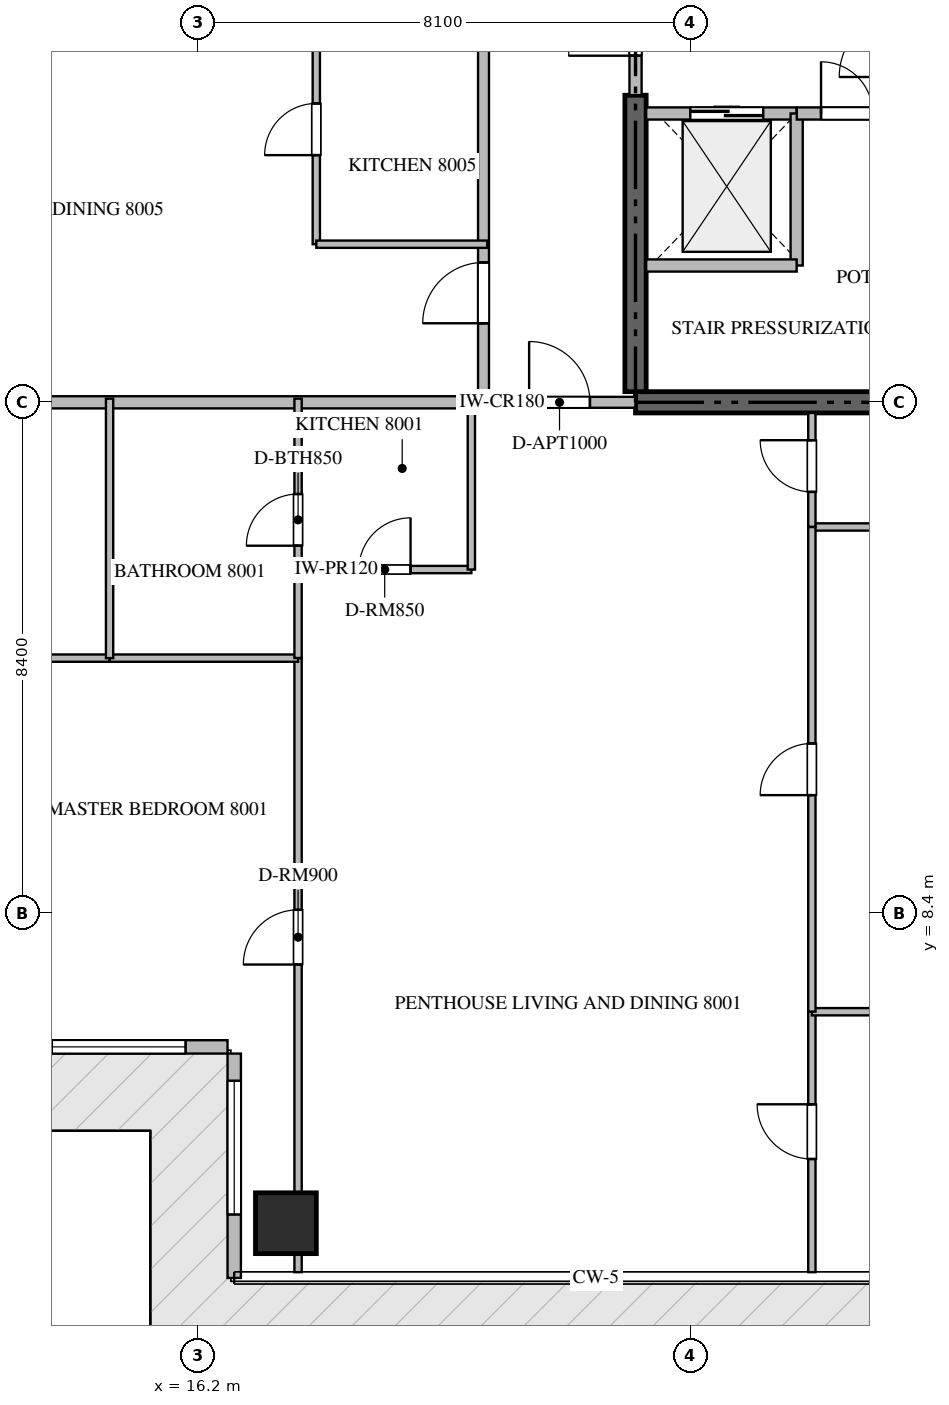
"""IFC4 building model, lengths in metres.
Left out: names, types, materials, properties, quantities, classifications, styles, units other than length and angle.
Written with IfcOpenShell. Run it as: python <this file> out.ifc"""

import sys

from ifc_helpers import new_model, si_unit, direction, frame, frame_2d, origin, origin_2d, place, context, subcontext, project, spatial, rectangle, extrude, source, transform, mapped, element, fill, save


model = new_model("IFC4")
c1 = context("Model", 3, precision=1e-05, world=origin(), true_north=direction((0.0, 1.0)))
c2 = subcontext(c1, "Body", "Model", "MODEL_VIEW")
j1 = project(units=[si_unit("LENGTHUNIT", "METRE"), si_unit("PLANEANGLEUNIT", "RADIAN")], contexts=[c1])
p1 = place(None, origin())
s1 = spatial("IfcSite", under=j1, at=p1, CompositionType="ELEMENT")
p2 = place(p1, origin())
s2 = spatial("IfcBuilding", under=s1, at=p2, CompositionType="ELEMENT")
p3 = place(p2, frame((0.0, 0.0, 321.8)))
s3 = spatial("IfcBuildingStorey", under=s2, at=p3, CompositionType="ELEMENT", Elevation=321.8)
p4 = place(p3, frame((23.4, 16.8, -0.26), z_axis=(0.0, 0.0, 1.0), x_axis=(1.0, 0.0, 0.0)))
e1 = element("IfcWall", 1, at=p4, inside=s3, PredefinedType="SHEAR", context=c2, shape_type="SweptSolid", body=[
    extrude(rectangle(XDim=18.0, YDim=0.35, at=frame_2d((9.0, 0.0))), origin(), (0.0, 0.0, 1.0), 4.048),
])
p5 = place(p3, frame((23.4, 16.975, -0.26), z_axis=(0.0, 0.0, 1.0), x_axis=(0.0, 1.0, 0.0)))
e2 = element("IfcWall", 2, at=p5, inside=s3, PredefinedType="SHEAR", context=c2, shape_type="SweptSolid", body=[
    extrude(rectangle(XDim=4.875, YDim=0.35, at=frame_2d((2.438, 0.0))), origin(), (0.0, 0.0, 1.0), 4.048),
])
m1 = source(origin(), c2, "Body", "SweptSolid", [
    extrude(rectangle(XDim=1.0, YDim=1.0, at=origin_2d()), origin(), (0.0, 0.0, 1.0), 4.05),
])
p6 = place(p3, frame((17.65, 3.3, -0.26), z_axis=(0.0, 0.0, 1.0), x_axis=(1.0, 0.0, 0.0)))
e3 = element("IfcColumn", 3, at=p6, inside=s3, PredefinedType="COLUMN", context=c2, shape_type="MappedRepresentation", body=[
    mapped(m1, transform((0.0, 0.0, 0.0), scale=1.0)),
])
p7 = place(p3, frame((13.11, 6.2, 0.0), z_axis=(0.0, 0.0, 1.0), x_axis=(1.0, 0.0, 0.0)))
e4 = element("IfcWall", 4, at=p7, inside=s3, PredefinedType="ELEMENTEDWALL", context=c2, shape_type="SweptSolid", body=[
    extrude(rectangle(XDim=3.58, YDim=0.22, at=frame_2d((1.79, 0.0))), origin(), (0.0, 0.0, 1.0), 3.775),
])
p8 = place(p7, frame((0.69, 0.0, 0.65)))
e5 = element("IfcOpeningElement", 5, at=p8, cuts=e4, PredefinedType="OPENING", context=c2, shape_type="SweptSolid", body=[
    extrude(rectangle(XDim=2.2, YDim=2.4, at=frame_2d((1.1, 1.2))), frame((0.0, 0.12, 0.0), z_axis=(0.0, -1.0, 0.0), x_axis=(1.0, 0.0, 0.0)), (0.0, 0.0, 1.0), 0.24),
])
p9 = place(p3, frame((16.8, 6.09, 0.0), z_axis=(0.0, 0.0, 1.0), x_axis=(0.0, -1.0, 0.0)))
e6 = element("IfcWall", 6, at=p9, inside=s3, PredefinedType="ELEMENTEDWALL", context=c2, shape_type="SweptSolid", body=[
    extrude(rectangle(XDim=3.69, YDim=0.22, at=frame_2d((1.845, 0.0))), origin(), (0.0, 0.0, 1.0), 3.775),
])
p10 = place(p9, frame((0.447, 0.0, 0.65)))
e7 = element("IfcOpeningElement", 7, at=p10, cuts=e6, PredefinedType="OPENING", context=c2, shape_type="SweptSolid", body=[
    extrude(rectangle(XDim=2.2, YDim=2.4, at=frame_2d((1.1, 1.2))), frame((0.0, 0.12, 0.0), z_axis=(0.0, -1.0, 0.0), x_axis=(1.0, 0.0, 0.0)), (0.0, 0.0, 1.0), 0.24),
])
p11 = place(p3, frame((23.575, 21.55, 0.0), z_axis=(0.0, 0.0, 1.0), x_axis=(1.0, 0.0, 0.0)))
e8 = element("IfcWall", 8, at=p11, inside=s3, PredefinedType="STANDARD", context=c2, shape_type="SweptSolid", body=[
    extrude(rectangle(XDim=2.475, YDim=0.2, at=frame_2d((1.238, 0.0))), origin(), (0.0, 0.0, 1.0), 3.79),
])
p12 = place(p11, frame((0.725, 0.0, 0.0)))
e9 = element("IfcOpeningElement", 9, at=p12, cuts=e8, PredefinedType="OPENING", context=c2, shape_type="SweptSolid", body=[
    extrude(rectangle(XDim=1.2, YDim=2.2, at=frame_2d((0.6, 1.1))), frame((0.0, 0.11, 0.0), z_axis=(0.0, -1.0, 0.0), x_axis=(1.0, 0.0, 0.0)), (0.0, 0.0, 1.0), 0.22),
])
p13 = place(p3, frame((26.05, 19.05, 0.0), z_axis=(0.0, 0.0, 1.0), x_axis=(0.0, 1.0, 0.0)))
e10 = element("IfcWall", 10, at=p13, inside=s3, PredefinedType="STANDARD", context=c2, shape_type="SweptSolid", body=[
    extrude(rectangle(XDim=2.5, YDim=0.2, at=frame_2d((1.25, 0.0))), origin(), (0.0, 0.0, 1.0), 3.79),
])
p14 = place(p3, frame((23.575, 19.05, 0.0), z_axis=(0.0, 0.0, 1.0), x_axis=(1.0, 0.0, 0.0)))
e11 = element("IfcWall", 11, at=p14, inside=s3, PredefinedType="STANDARD", context=c2, shape_type="SweptSolid", body=[
    extrude(rectangle(XDim=2.475, YDim=0.2, at=frame_2d((1.238, 0.0))), origin(), (0.0, 0.0, 1.0), 3.79),
])
p15 = place(p3, frame((26.052, 21.55, 0.0), z_axis=(0.0, 0.0, 1.0), x_axis=(1.0, 0.0, 0.0)))
e12 = element("IfcWall", 12, at=p15, inside=s3, PredefinedType="STANDARD", context=c2, shape_type="SweptSolid", body=[
    extrude(rectangle(XDim=1.648, YDim=0.2, at=frame_2d((0.824, 0.0))), origin(), (0.0, 0.0, 1.0), 3.79),
])
p16 = place(p15, frame((0.399, 0.0, 0.0)))
e13 = element("IfcOpeningElement", 13, at=p16, cuts=e12, PredefinedType="OPENING", context=c2, shape_type="SweptSolid", body=[
    extrude(rectangle(XDim=0.85, YDim=2.1, at=frame_2d((0.425, 1.05))), frame((0.0, 0.11, 0.0), z_axis=(0.0, -1.0, 0.0), x_axis=(1.0, 0.0, 0.0)), (0.0, 0.0, 1.0), 0.22),
])
p17 = place(p3, frame((23.4, 21.852, 0.0), z_axis=(0.0, 0.0, 1.0), x_axis=(0.0, 1.0, 0.0)))
e14 = element("IfcWall", 14, at=p17, inside=s3, PredefinedType="STANDARD", context=c2, shape_type="SweptSolid", body=[
    extrude(rectangle(XDim=2.396, YDim=0.2, at=frame_2d((1.198, 0.0))), origin(), (0.0, 0.0, 1.0), 3.79),
])
p18 = place(p17, frame((0.648, 0.0, 0.0)))
e15 = element("IfcOpeningElement", 15, at=p18, cuts=e14, PredefinedType="OPENING", context=c2, shape_type="SweptSolid", body=[
    extrude(rectangle(XDim=1.1, YDim=2.15, at=frame_2d((0.55, 1.075))), frame((0.0, 0.11, 0.0), z_axis=(0.0, -1.0, 0.0), x_axis=(1.0, 0.0, 0.0)), (0.0, 0.0, 1.0), 0.22),
])
p19 = place(p3, frame((9.282, 16.8, 0.0), z_axis=(0.0, 0.0, 1.0), x_axis=(1.0, 0.0, 0.0)))
e16 = element("IfcWall", 16, at=p19, inside=s3, PredefinedType="PARTITIONING", context=c2, shape_type="SweptSolid", body=[
    extrude(rectangle(XDim=11.618, YDim=0.2, at=frame_2d((5.809, 0.0))), origin(), (0.0, 0.0, 1.0), 3.79),
])
p20 = place(p3, frame((20.902, 16.8, 0.0), z_axis=(0.0, 0.0, 1.0), x_axis=(1.0, 0.0, 0.0)))
e17 = element("IfcWall", 17, at=p20, inside=s3, PredefinedType="PARTITIONING", context=c2, shape_type="SweptSolid", body=[
    extrude(rectangle(XDim=2.496, YDim=0.18, at=frame_2d((1.248, 0.0))), origin(), (0.0, 0.0, 1.0), 3.79),
])
p21 = place(p20, frame((0.748, 0.0, 0.0)))
e18 = element("IfcOpeningElement", 18, at=p21, cuts=e17, PredefinedType="OPENING", context=c2, shape_type="SweptSolid", body=[
    extrude(rectangle(XDim=1.0, YDim=2.15, at=frame_2d((0.5, 1.075))), frame((0.0, 0.1, 0.0), z_axis=(0.0, -1.0, 0.0), x_axis=(1.0, 0.0, 0.0)), (0.0, 0.0, 1.0), 0.2),
])
p22 = place(p3, frame((20.9, 16.8, 0.0), z_axis=(0.0, 0.0, 1.0), x_axis=(0.0, 1.0, 0.0)))
e19 = element("IfcWall", 19, at=p22, inside=s3, PredefinedType="PARTITIONING", context=c2, shape_type="SweptSolid", body=[
    extrude(rectangle(XDim=16.8, YDim=0.18, at=frame_2d((8.4, 0.0))), origin(), (0.0, 0.0, 1.0), 3.79),
])
p23 = place(p22, frame((1.3, 0.0, 0.0)))
e20 = element("IfcOpeningElement", 20, at=p23, cuts=e19, PredefinedType="OPENING", context=c2, shape_type="SweptSolid", body=[
    extrude(rectangle(XDim=1.0, YDim=2.15, at=frame_2d((0.5, 1.075))), frame((0.0, 0.1, 0.0), z_axis=(0.0, -1.0, 0.0), x_axis=(1.0, 0.0, 0.0)), (0.0, 0.0, 1.0), 0.2),
])
p24 = place(p3, frame((17.85, 14.05, 0.0), z_axis=(0.0, 0.0, 1.0), x_axis=(1.0, 0.0, 0.0)))
e21 = element("IfcWall", 21, at=p24, inside=s3, PredefinedType="PARTITIONING", context=c2, shape_type="SweptSolid", body=[
    extrude(rectangle(XDim=2.85, YDim=0.12, at=frame_2d((1.425, 0.0))), origin(), (0.0, 0.0, 1.0), 3.79),
])
p25 = place(p24, frame((1.0, 0.0, 0.0)))
e22 = element("IfcOpeningElement", 22, at=p25, cuts=e21, PredefinedType="OPENING", context=c2, shape_type="SweptSolid", body=[
    extrude(rectangle(XDim=0.85, YDim=2.1, at=frame_2d((0.425, 1.05))), frame((0.0, 0.07, 0.0), z_axis=(0.0, -1.0, 0.0), x_axis=(1.0, 0.0, 0.0)), (0.0, 0.0, 1.0), 0.14),
])
p26 = place(p3, frame((20.7, 14.05, 0.0), z_axis=(0.0, 0.0, 1.0), x_axis=(0.0, 1.0, 0.0)))
e23 = element("IfcWall", 23, at=p26, inside=s3, PredefinedType="PARTITIONING", context=c2, shape_type="SweptSolid", body=[
    extrude(rectangle(XDim=2.81, YDim=0.12, at=frame_2d((1.405, 0.0))), origin(), (0.0, 0.0, 1.0), 3.79),
])
p27 = place(p3, frame((17.85, 2.495, 0.0), z_axis=(0.0, 0.0, 1.0), x_axis=(0.0, 1.0, 0.0)))
e24 = element("IfcWall", 24, at=p27, inside=s3, PredefinedType="PARTITIONING", context=c2, shape_type="SweptSolid", body=[
    extrude(rectangle(XDim=10.098, YDim=0.12, at=frame_2d((5.049, 0.0))), origin(), (0.0, 0.0, 1.0), 3.292),
])
p28 = place(p27, frame((5.059, 0.0, 0.0)))
e25 = element("IfcOpeningElement", 25, at=p28, cuts=e24, PredefinedType="OPENING", context=c2, shape_type="SweptSolid", body=[
    extrude(rectangle(XDim=0.9, YDim=2.1, at=frame_2d((0.45, 1.05))), frame((0.0, 0.07, 0.0), z_axis=(0.0, -1.0, 0.0), x_axis=(1.0, 0.0, 0.0)), (0.0, 0.0, 1.0), 0.14),
])
p29 = place(p3, frame((9.295, 12.593, 0.0), z_axis=(0.0, 0.0, 1.0), x_axis=(1.0, 0.0, 0.0)))
e26 = element("IfcWall", 26, at=p29, inside=s3, PredefinedType="PARTITIONING", context=c2, shape_type="SweptSolid", body=[
    extrude(rectangle(XDim=5.455, YDim=0.12, at=frame_2d((2.728, 0.0))), origin(), (0.0, 0.0, 1.0), 3.79),
])
p30 = place(p29, frame((3.224, 0.0, 0.0)))
e27 = element("IfcOpeningElement", 27, at=p30, cuts=e26, PredefinedType="OPENING", context=c2, shape_type="SweptSolid", body=[
    extrude(rectangle(XDim=0.85, YDim=2.1, at=frame_2d((0.425, 1.05))), frame((0.0, 0.07, 0.0), z_axis=(0.0, -1.0, 0.0), x_axis=(1.0, 0.0, 0.0)), (0.0, 0.0, 1.0), 0.14),
])
p31 = place(p3, frame((14.752, 12.593, 0.0), z_axis=(0.0, 0.0, 1.0), x_axis=(1.0, 0.0, 0.0)))
e28 = element("IfcWall", 28, at=p31, inside=s3, PredefinedType="PARTITIONING", context=c2, shape_type="SweptSolid", body=[
    extrude(rectangle(XDim=3.098, YDim=0.12, at=frame_2d((1.549, 0.0))), origin(), (0.0, 0.0, 1.0), 3.79),
])
p32 = place(p3, frame((14.75, 12.593, 0.0), z_axis=(0.0, 0.0, 1.0), x_axis=(0.0, 1.0, 0.0)))
e29 = element("IfcWall", 29, at=p32, inside=s3, PredefinedType="PARTITIONING", context=c2, shape_type="SweptSolid", body=[
    extrude(rectangle(XDim=4.267, YDim=0.12, at=frame_2d((2.134, 0.0))), origin(), (0.0, 0.0, 1.0), 3.79),
])
p33 = place(p3, frame((17.85, 12.595, 0.0), z_axis=(0.0, 0.0, 1.0), x_axis=(0.0, 1.0, 0.0)))
e30 = element("IfcWall", 30, at=p33, inside=s3, PredefinedType="PARTITIONING", context=c2, shape_type="SweptSolid", body=[
    extrude(rectangle(XDim=4.265, YDim=0.12, at=frame_2d((2.133, 0.0))), origin(), (0.0, 0.0, 1.0), 3.372),
])
p34 = place(p33, frame((1.847, 0.0, 0.0)))
e31 = element("IfcOpeningElement", 31, at=p34, cuts=e30, PredefinedType="OPENING", context=c2, shape_type="SweptSolid", body=[
    extrude(rectangle(XDim=0.85, YDim=2.1, at=frame_2d((0.425, 1.05))), frame((0.0, 0.07, 0.0), z_axis=(0.0, -1.0, 0.0), x_axis=(1.0, 0.0, 0.0)), (0.0, 0.0, 1.0), 0.14),
])
p35 = place(p3, frame((26.3, 2.495, 0.0), z_axis=(0.0, 0.0, 1.0), x_axis=(0.0, 1.0, 0.0)))
e32 = element("IfcWall", 32, at=p35, inside=s3, PredefinedType="PARTITIONING", context=c2, shape_type="SweptSolid", body=[
    extrude(rectangle(XDim=4.283, YDim=0.12, at=frame_2d((2.142, 0.0))), origin(), (0.0, 0.0, 1.0), 3.79),
])
p36 = place(p35, frame((1.861, 0.0, 0.0)))
e33 = element("IfcOpeningElement", 33, at=p36, cuts=e32, PredefinedType="OPENING", context=c2, shape_type="SweptSolid", body=[
    extrude(rectangle(XDim=0.9, YDim=2.1, at=frame_2d((0.45, 1.05))), frame((0.0, 0.07, 0.0), z_axis=(0.0, -1.0, 0.0), x_axis=(1.0, 0.0, 0.0)), (0.0, 0.0, 1.0), 0.14),
])
for number, where, z_axis, x_axis in (
    (34, (26.3, 6.778, 0.0), (0.0, 0.0, 1.0), (1.0, 0.0, 0.0)),
    (35, (26.3, 14.75, 0.0), (0.0, 0.0, 1.0), (1.0, 0.0, 0.0)),
):
    element("IfcWall", number, at=place(p3, frame(where, z_axis=z_axis, x_axis=x_axis)), inside=s3, PredefinedType="PARTITIONING", context=c2, shape_type="SweptSolid", body=[
        extrude(rectangle(XDim=7.16, YDim=0.12, at=frame_2d((3.58, 0.0))), origin(), (0.0, 0.0, 1.0), 3.79),
    ])
p37 = place(p3, frame((26.3, 6.78, 0.0), z_axis=(0.0, 0.0, 1.0), x_axis=(0.0, 1.0, 0.0)))
e36 = element("IfcWall", 36, at=p37, inside=s3, PredefinedType="PARTITIONING", context=c2, shape_type="SweptSolid", body=[
    extrude(rectangle(XDim=7.97, YDim=0.12, at=frame_2d((3.985, 0.0))), origin(), (0.0, 0.0, 1.0), 3.79),
])
p38 = place(p37, frame((3.56, 0.0, 0.0)))
e37 = element("IfcOpeningElement", 37, at=p38, cuts=e36, PredefinedType="OPENING", context=c2, shape_type="SweptSolid", body=[
    extrude(rectangle(XDim=0.85, YDim=2.1, at=frame_2d((0.425, 1.05))), frame((0.0, 0.07, 0.0), z_axis=(0.0, -1.0, 0.0), x_axis=(1.0, 0.0, 0.0)), (0.0, 0.0, 1.0), 0.14),
])
p39 = place(p3, frame((26.3, 14.752, 0.0), z_axis=(0.0, 0.0, 1.0), x_axis=(0.0, 1.0, 0.0)))
e38 = element("IfcWall", 38, at=p39, inside=s3, PredefinedType="PARTITIONING", context=c2, shape_type="SweptSolid", body=[
    extrude(rectangle(XDim=1.873, YDim=0.12, at=frame_2d((0.937, 0.0))), origin(), (0.0, 0.0, 1.0), 3.79),
])
p40 = place(p39, frame((0.575, 0.0, 0.0)))
e39 = element("IfcOpeningElement", 39, at=p40, cuts=e38, PredefinedType="OPENING", context=c2, shape_type="SweptSolid", body=[
    extrude(rectangle(XDim=0.85, YDim=2.1, at=frame_2d((0.425, 1.05))), frame((0.0, 0.07, 0.0), z_axis=(0.0, -1.0, 0.0), x_axis=(1.0, 0.0, 0.0)), (0.0, 0.0, 1.0), 0.14),
])
p41 = place(p3, frame((18.15, 19.4, 0.0), z_axis=(0.0, 0.0, 1.0), x_axis=(0.0, 1.0, 0.0)))
e40 = element("IfcWall", 40, at=p41, inside=s3, PredefinedType="PARTITIONING", context=c2, shape_type="SweptSolid", body=[
    extrude(rectangle(XDim=3.78, YDim=0.12, at=frame_2d((1.89, 0.0))), origin(), (0.0, 0.0, 1.0), 3.79),
])
p42 = place(p41, frame((1.465, 0.0, 0.0)))
e41 = element("IfcOpeningElement", 41, at=p42, cuts=e40, PredefinedType="OPENING", context=c2, shape_type="SweptSolid", body=[
    extrude(rectangle(XDim=0.85, YDim=2.1, at=frame_2d((0.425, 1.05))), frame((0.0, 0.07, 0.0), z_axis=(0.0, -1.0, 0.0), x_axis=(1.0, 0.0, 0.0)), (0.0, 0.0, 1.0), 0.14),
])
p43 = place(p3, frame((18.15, 19.4, 0.0), z_axis=(0.0, 0.0, 1.0), x_axis=(1.0, 0.0, 0.0)))
e42 = element("IfcWall", 42, at=p43, inside=s3, PredefinedType="PARTITIONING", context=c2, shape_type="SweptSolid", body=[
    extrude(rectangle(XDim=2.81, YDim=0.12, at=frame_2d((1.405, 0.0))), origin(), (0.0, 0.0, 1.0), 3.79),
])
m2 = source(origin(), c2, "Body", "SweptSolid", [
    extrude(rectangle(XDim=2.2, YDim=2.4, at=frame_2d((1.1, 1.2))), frame((0.0, 0.03, 0.0), z_axis=(0.0, -1.0, 0.0), x_axis=(1.0, 0.0, 0.0)), (0.0, 0.0, 1.0), 0.06),
])
p44 = place(p8, origin())
e43 = element("IfcWindow", 43, at=p44, inside=s3, PartitioningType="SINGLE_PANEL", PredefinedType="WINDOW", context=c2, shape_type="MappedRepresentation", body=[
    mapped(m2, transform((0.0, 0.0, 0.0), scale=1.0)),
])
fill(e5, e43)
p45 = place(p10, origin())
e44 = element("IfcWindow", 44, at=p45, inside=s3, PartitioningType="SINGLE_PANEL", PredefinedType="WINDOW", context=c2, shape_type="MappedRepresentation", body=[
    mapped(m2, transform((0.0, 0.0, 0.0), scale=1.0)),
])
fill(e7, e44)
m3 = source(origin(), c2, "Body", "SweptSolid", [
    extrude(rectangle(XDim=1.2, YDim=2.2, at=frame_2d((0.6, 1.1))), frame((0.0, 0.025, 0.0), z_axis=(0.0, -1.0, 0.0), x_axis=(1.0, 0.0, 0.0)), (0.0, 0.0, 1.0), 0.05),
])
p46 = place(p12, origin())
e45 = element("IfcDoor", 45, at=p46, inside=s3, OperationType="DOUBLE_DOOR_SLIDING", PredefinedType="DOOR", context=c2, shape_type="MappedRepresentation", body=[
    mapped(m3, transform((0.0, 0.0, 0.0), scale=1.0)),
])
fill(e9, e45)
m4 = source(origin(), c2, "Body", "SweptSolid", [
    extrude(rectangle(XDim=0.85, YDim=2.1, at=frame_2d((0.425, 1.05))), frame((0.0, 0.025, 0.0), z_axis=(0.0, -1.0, 0.0), x_axis=(1.0, 0.0, 0.0)), (0.0, 0.0, 1.0), 0.05),
])
p47 = place(p16, origin())
e46 = element("IfcDoor", 46, at=p47, inside=s3, OperationType="SINGLE_SWING_LEFT", PredefinedType="DOOR", context=c2, shape_type="MappedRepresentation", body=[
    mapped(m4, transform((0.0, 0.0, 0.0), scale=1.0)),
])
fill(e13, e46)
m5 = source(origin(), c2, "Body", "SweptSolid", [
    extrude(rectangle(XDim=1.1, YDim=2.15, at=frame_2d((0.55, 1.075))), frame((0.0, 0.025, 0.0), z_axis=(0.0, -1.0, 0.0), x_axis=(1.0, 0.0, 0.0)), (0.0, 0.0, 1.0), 0.05),
])
p48 = place(p18, origin())
e47 = element("IfcDoor", 47, at=p48, inside=s3, OperationType="SINGLE_SWING_LEFT", PredefinedType="DOOR", context=c2, shape_type="MappedRepresentation", body=[
    mapped(m5, transform((0.0, 0.0, 0.0), scale=1.0)),
])
fill(e15, e47)
m6 = source(origin(), c2, "Body", "SweptSolid", [
    extrude(rectangle(XDim=1.0, YDim=2.15, at=frame_2d((0.5, 1.075))), frame((0.0, 0.025, 0.0), z_axis=(0.0, -1.0, 0.0), x_axis=(1.0, 0.0, 0.0)), (0.0, 0.0, 1.0), 0.05),
])
p49 = place(p21, origin())
e48 = element("IfcDoor", 48, at=p49, inside=s3, OperationType="SINGLE_SWING_LEFT", PredefinedType="DOOR", context=c2, shape_type="MappedRepresentation", body=[
    mapped(m6, transform((0.0, 0.0, 0.0), scale=1.0)),
])
fill(e18, e48)
p50 = place(p23, origin())
e49 = element("IfcDoor", 49, at=p50, inside=s3, OperationType="SINGLE_SWING_LEFT", PredefinedType="DOOR", context=c2, shape_type="MappedRepresentation", body=[
    mapped(m6, transform((0.0, 0.0, 0.0), scale=1.0)),
])
fill(e20, e49)
p51 = place(p25, origin())
e50 = element("IfcDoor", 50, at=p51, inside=s3, OperationType="SINGLE_SWING_RIGHT", PredefinedType="DOOR", context=c2, shape_type="MappedRepresentation", body=[
    mapped(m4, transform((0.0, 0.0, 0.0), scale=1.0)),
])
fill(e22, e50)
m7 = source(origin(), c2, "Body", "SweptSolid", [
    extrude(rectangle(XDim=0.9, YDim=2.1, at=frame_2d((0.45, 1.05))), frame((0.0, 0.025, 0.0), z_axis=(0.0, -1.0, 0.0), x_axis=(1.0, 0.0, 0.0)), (0.0, 0.0, 1.0), 0.05),
])
p52 = place(p28, origin())
e51 = element("IfcDoor", 51, at=p52, inside=s3, OperationType="SINGLE_SWING_LEFT", PredefinedType="DOOR", context=c2, shape_type="MappedRepresentation", body=[
    mapped(m7, transform((0.0, 0.0, 0.0), scale=1.0)),
])
fill(e25, e51)
p53 = place(p34, origin())
e52 = element("IfcDoor", 52, at=p53, inside=s3, OperationType="SINGLE_SWING_LEFT", PredefinedType="DOOR", context=c2, shape_type="MappedRepresentation", body=[
    mapped(m4, transform((0.0, 0.0, 0.0), scale=1.0)),
])
fill(e31, e52)
p54 = place(p36, origin())
e53 = element("IfcDoor", 53, at=p54, inside=s3, OperationType="SINGLE_SWING_RIGHT", PredefinedType="DOOR", context=c2, shape_type="MappedRepresentation", body=[
    mapped(m7, transform((0.0, 0.0, 0.0), scale=1.0)),
])
fill(e33, e53)
p55 = place(p38, origin())
e54 = element("IfcDoor", 54, at=p55, inside=s3, OperationType="SINGLE_SWING_LEFT", PredefinedType="DOOR", context=c2, shape_type="MappedRepresentation", body=[
    mapped(m4, transform((0.0, 0.0, 0.0), scale=1.0)),
])
fill(e37, e54)
p56 = place(p40, origin())
e55 = element("IfcDoor", 55, at=p56, inside=s3, OperationType="SINGLE_SWING_RIGHT", PredefinedType="DOOR", context=c2, shape_type="MappedRepresentation", body=[
    mapped(m4, transform((0.0, 0.0, 0.0), scale=1.0)),
])
fill(e39, e55)
p57 = place(p42, origin())
e56 = element("IfcDoor", 56, at=p57, inside=s3, OperationType="SINGLE_SWING_LEFT", PredefinedType="DOOR", context=c2, shape_type="MappedRepresentation", body=[
    mapped(m4, transform((0.0, 0.0, 0.0), scale=1.0)),
])
fill(e41, e56)
save(model, sys.argv[1])
